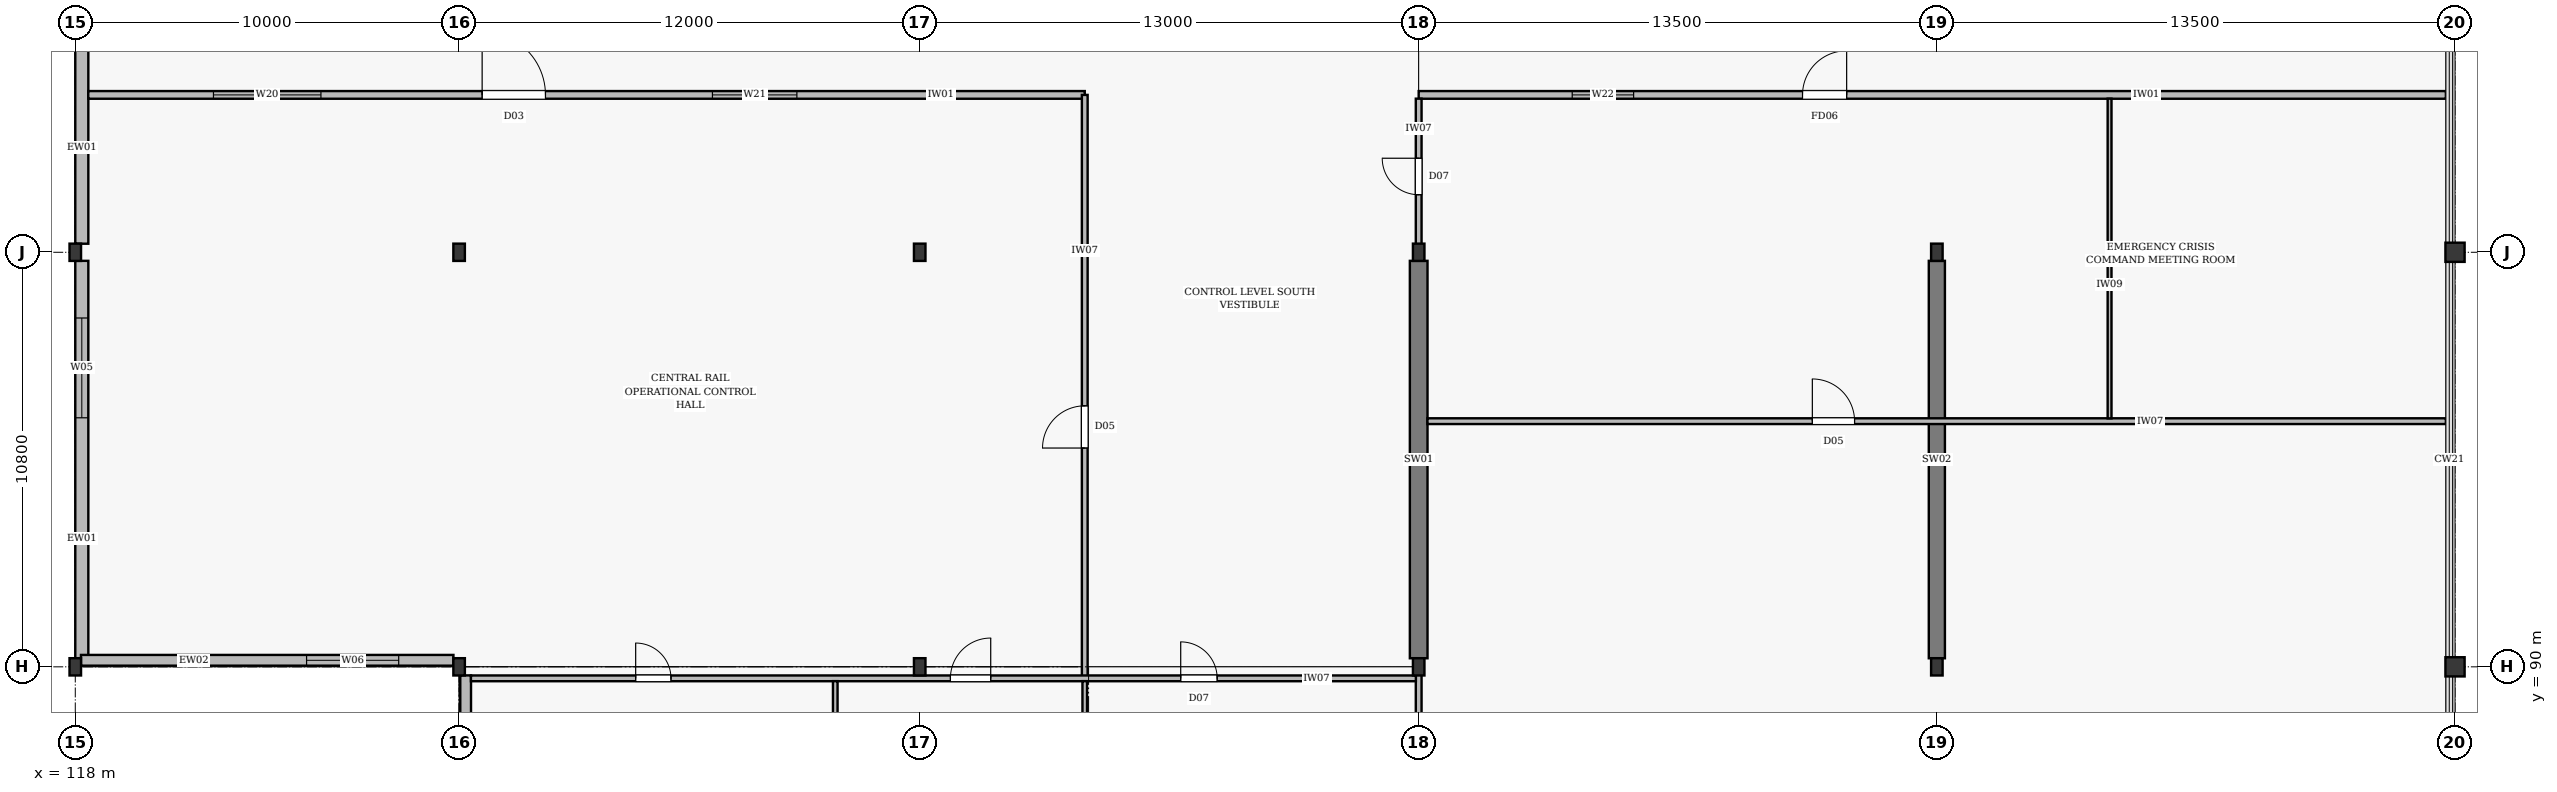
"""IFC4 building model, lengths in metres.
Left out: names, types, materials, properties, quantities, classifications, styles, units other than length and angle.
Written with IfcOpenShell. Run it as: python <this file> out.ifc"""

import sys

from ifc_helpers import new_model, si_unit, direction, frame, frame_2d, origin, origin_2d, place, context, subcontext, project, spatial, rectangle, i_section, extrude, element, fill, save


model = new_model("IFC4")
c1 = context("Model", 3, precision=1e-05, world=origin(), true_north=direction((0.0, 1.0)))
c2 = subcontext(c1, "Body", "Model", "MODEL_VIEW")
j1 = project(units=[si_unit("LENGTHUNIT", "METRE"), si_unit("PLANEANGLEUNIT", "RADIAN")], contexts=[c1])
p1 = place(None, origin())
s1 = spatial("IfcSite", under=j1, at=p1, CompositionType="ELEMENT")
p2 = place(p1, origin())
s2 = spatial("IfcBuilding", under=s1, at=p2, CompositionType="ELEMENT")
p3 = place(p2, frame((0.0, 0.0, 17.4)))
s3 = spatial("IfcBuildingStorey", under=s2, at=p3, CompositionType="ELEMENT", Elevation=17.4)
for number, where, z_axis, x_axis in (
    (1, (118.0, 90.0, 0.0), (0.0, 0.0, 1.0), (1.0, 0.0, 0.0)),
    (2, (118.0, 100.8, 0.0), (0.0, 0.0, 1.0), (1.0, 0.0, 0.0)),
    (3, (128.0, 90.0, 0.0), (0.0, 0.0, 1.0), (1.0, 0.0, 0.0)),
    (4, (128.0, 100.8, 0.0), (0.0, 0.0, 1.0), (1.0, 0.0, 0.0)),
    (5, (140.0, 90.0, 0.0), (0.0, 0.0, 1.0), (1.0, 0.0, 0.0)),
    (6, (140.0, 100.8, 0.0), (0.0, 0.0, 1.0), (1.0, 0.0, 0.0)),
    (7, (153.0, 90.0, 0.0), (0.0, 0.0, 1.0), (1.0, 0.0, 0.0)),
    (8, (153.0, 100.8, 0.0), (0.0, 0.0, 1.0), (1.0, 0.0, 0.0)),
    (9, (166.5, 90.0, 0.0), (0.0, 0.0, 1.0), (1.0, 0.0, 0.0)),
    (10, (166.5, 100.8, 0.0), (0.0, 0.0, 1.0), (1.0, 0.0, 0.0)),
):
    element("IfcColumn", number, at=place(p3, frame(where, z_axis=z_axis, x_axis=x_axis)), inside=s3, PredefinedType="COLUMN", context=c2, shape_type="SweptSolid", body=[
        extrude(i_section(OverallWidth=0.3, OverallDepth=0.45, WebThickness=0.014, FlangeThickness=0.026, at=origin_2d()), origin(), (0.0, 0.0, 1.0), 3.9),
    ])
for number, where, z_axis, x_axis in (
    (11, (180.0, 90.0, 0.0), (0.0, 0.0, 1.0), (1.0, 0.0, 0.0)),
    (12, (180.0, 100.8, 0.0), (0.0, 0.0, 1.0), (1.0, 0.0, 0.0)),
):
    element("IfcColumn", number, at=place(p3, frame(where, z_axis=z_axis, x_axis=x_axis)), inside=s3, PredefinedType="COLUMN", context=c2, shape_type="SweptSolid", body=[
        extrude(rectangle(XDim=0.5, YDim=0.5, at=origin_2d()), origin(), (0.0, 0.0, 1.0), 3.9),
    ])
p4 = place(p3, frame((153.0, 90.223, 0.0), z_axis=(0.0, 0.0, 1.0), x_axis=(0.0, 1.0, 0.0)))
e13 = element("IfcWall", 13, at=p4, inside=s3, PredefinedType="SHEAR", context=c2, shape_type="SweptSolid", body=[
    extrude(rectangle(XDim=10.354, YDim=0.46, at=frame_2d((5.177, 0.0))), origin(), (0.0, 0.0, 1.0), 3.68),
])
p5 = place(p3, frame((166.5, 90.223, 0.0), z_axis=(0.0, 0.0, 1.0), x_axis=(0.0, 1.0, 0.0)))
e14 = element("IfcWall", 14, at=p5, inside=s3, PredefinedType="SHEAR", context=c2, shape_type="SweptSolid", body=[
    extrude(rectangle(XDim=10.354, YDim=0.42, at=frame_2d((5.177, 0.0))), origin(), (0.0, 0.0, 1.0), 3.68),
])
p6 = place(p3, frame((118.17, 90.223, 0.0), z_axis=(0.0, 0.0, 1.0), x_axis=(0.0, 1.0, 0.0)))
e15 = element("IfcWall", 15, at=p6, inside=s3, PredefinedType="STANDARD", context=c2, shape_type="SweptSolid", body=[
    extrude(rectangle(XDim=10.354, YDim=0.34, at=frame_2d((5.177, 0.0))), origin(), (0.0, 0.0, 1.0), 3.25),
])
p7 = place(p6, frame((6.265, 0.0, 0.61)))
e16 = element("IfcOpeningElement", 16, at=p7, cuts=e15, PredefinedType="OPENING", context=c2, shape_type="SweptSolid", body=[
    extrude(rectangle(XDim=2.6, YDim=2.4, at=frame_2d((1.3, 1.2))), frame((0.0, 0.182, 0.0), z_axis=(0.0, -1.0, 0.0), x_axis=(1.0, 0.0, 0.0)), (0.0, 0.0, 1.0), 0.364),
])
p8 = place(p3, frame((118.17, 101.023, 0.0), z_axis=(0.0, 0.0, 1.0), x_axis=(0.0, 1.0, 0.0)))
e17 = element("IfcWall", 17, at=p8, inside=s3, PredefinedType="STANDARD", context=c2, shape_type="SweptSolid", body=[
    extrude(rectangle(XDim=10.354, YDim=0.34, at=frame_2d((5.177, 0.0))), origin(), (0.0, 0.0, 1.0), 3.22),
])
p9 = place(p8, frame((5.015, 0.0, 0.58)))
e18 = element("IfcOpeningElement", 18, at=p9, cuts=e17, PredefinedType="OPENING", context=c2, shape_type="SweptSolid", body=[
    extrude(rectangle(XDim=2.6, YDim=2.4, at=frame_2d((1.3, 1.2))), frame((0.0, 0.182, 0.0), z_axis=(0.0, -1.0, 0.0), x_axis=(1.0, 0.0, 0.0)), (0.0, 0.0, 1.0), 0.364),
])
p10 = place(p3, frame((118.148, 90.17, 0.0), z_axis=(0.0, 0.0, 1.0), x_axis=(1.0, 0.0, 0.0)))
e19 = element("IfcWall", 19, at=p10, inside=s3, PredefinedType="STANDARD", context=c2, shape_type="SweptSolid", body=[
    extrude(rectangle(XDim=9.704, YDim=0.28, at=frame_2d((4.852, 0.0))), origin(), (0.0, 0.0, 1.0), 3.22),
])
p11 = place(p10, frame((5.878, 0.0, 0.58)))
e20 = element("IfcOpeningElement", 20, at=p11, cuts=e19, PredefinedType="OPENING", context=c2, shape_type="SweptSolid", body=[
    extrude(rectangle(XDim=2.4, YDim=2.4, at=frame_2d((1.2, 1.2))), frame((0.0, 0.152, 0.0), z_axis=(0.0, -1.0, 0.0), x_axis=(1.0, 0.0, 0.0)), (0.0, 0.0, 1.0), 0.304),
])
p12 = place(p3, frame((128.17, 79.423, 0.0), z_axis=(0.0, 0.0, 1.0), x_axis=(0.0, 1.0, 0.0)))
e21 = element("IfcWall", 21, at=p12, inside=s3, PredefinedType="STANDARD", context=c2, shape_type="SweptSolid", body=[
    extrude(rectangle(XDim=10.354, YDim=0.28, at=frame_2d((5.177, 0.0))), origin(), (0.0, 0.0, 1.0), 3.22),
])
p13 = place(p12, frame((1.688, 0.0, 0.75)))
e22 = element("IfcOpeningElement", 22, at=p13, cuts=e21, PredefinedType="OPENING", context=c2, shape_type="SweptSolid", body=[
    extrude(rectangle(XDim=2.2, YDim=2.2, at=frame_2d((1.1, 1.1))), frame((0.0, 0.152, 0.0), z_axis=(0.0, -1.0, 0.0), x_axis=(1.0, 0.0, 0.0)), (0.0, 0.0, 1.0), 0.304),
])
p14 = place(p12, frame((6.965, 0.0, 1.05)))
e23 = element("IfcOpeningElement", 23, at=p14, cuts=e21, PredefinedType="OPENING", context=c2, shape_type="SweptSolid", body=[
    extrude(rectangle(XDim=1.2, YDim=0.9, at=frame_2d((0.6, 0.45))), frame((0.0, 0.152, 0.0), z_axis=(0.0, -1.0, 0.0), x_axis=(1.0, 0.0, 0.0)), (0.0, 0.0, 1.0), 0.304),
])
p15 = place(p3, frame((118.338, 104.9, 0.0), z_axis=(0.0, 0.0, 1.0), x_axis=(1.0, 0.0, 0.0)))
e24 = element("IfcWall", 24, at=p15, inside=s3, PredefinedType="PARTITIONING", context=c2, shape_type="SweptSolid", body=[
    extrude(rectangle(XDim=25.962, YDim=0.2, at=frame_2d((12.981, 0.0))), origin(), (0.0, 0.0, 1.0), 3.31),
])
p16 = place(p15, frame((10.262, 0.0, 0.005)))
e25 = element("IfcOpeningElement", 25, at=p16, cuts=e24, PredefinedType="OPENING", context=c2, shape_type="SweptSolid", body=[
    extrude(rectangle(XDim=1.65, YDim=2.2, at=frame_2d((0.825, 1.1))), frame((0.0, 0.112, 0.0), z_axis=(0.0, -1.0, 0.0), x_axis=(1.0, 0.0, 0.0)), (0.0, 0.0, 1.0), 0.224),
])
p17 = place(p15, frame((3.262, 0.0, 1.05)))
e26 = element("IfcOpeningElement", 26, at=p17, cuts=e24, PredefinedType="OPENING", context=c2, shape_type="SweptSolid", body=[
    extrude(rectangle(XDim=2.8, YDim=1.8, at=frame_2d((1.4, 0.9))), frame((0.0, 0.112, 0.0), z_axis=(0.0, -1.0, 0.0), x_axis=(1.0, 0.0, 0.0)), (0.0, 0.0, 1.0), 0.224),
])
p18 = place(p15, frame((16.262, 0.0, 1.05)))
e27 = element("IfcOpeningElement", 27, at=p18, cuts=e24, PredefinedType="OPENING", context=c2, shape_type="SweptSolid", body=[
    extrude(rectangle(XDim=2.2, YDim=1.6, at=frame_2d((1.1, 0.8))), frame((0.0, 0.112, 0.0), z_axis=(0.0, -1.0, 0.0), x_axis=(1.0, 0.0, 0.0)), (0.0, 0.0, 1.0), 0.224),
])
p19 = place(p3, frame((153.0, 104.9, 0.0), z_axis=(0.0, 0.0, 1.0), x_axis=(1.0, 0.0, 0.0)))
e28 = element("IfcWall", 28, at=p19, inside=s3, PredefinedType="PARTITIONING", context=c2, shape_type="SweptSolid", body=[
    extrude(rectangle(XDim=26.762, YDim=0.2, at=frame_2d((13.381, 0.0))), origin(), (0.0, 0.0, 1.0), 3.31),
])
p20 = place(p19, frame((10.0, 0.0, 0.005)))
e29 = element("IfcOpeningElement", 29, at=p20, cuts=e28, PredefinedType="OPENING", context=c2, shape_type="SweptSolid", body=[
    extrude(rectangle(XDim=1.15, YDim=2.15, at=frame_2d((0.575, 1.075))), frame((0.0, 0.112, 0.0), z_axis=(0.0, -1.0, 0.0), x_axis=(1.0, 0.0, 0.0)), (0.0, 0.0, 1.0), 0.224),
])
p21 = place(p19, frame((4.0, 0.0, 1.05)))
e30 = element("IfcOpeningElement", 30, at=p21, cuts=e28, PredefinedType="OPENING", context=c2, shape_type="SweptSolid", body=[
    extrude(rectangle(XDim=1.6, YDim=1.5, at=frame_2d((0.8, 0.75))), frame((0.0, 0.112, 0.0), z_axis=(0.0, -1.0, 0.0), x_axis=(1.0, 0.0, 0.0)), (0.0, 0.0, 1.0), 0.224),
])
p22 = place(p3, frame((144.3, 89.7, 0.0), z_axis=(0.0, 0.0, 1.0), x_axis=(0.0, 1.0, 0.0)))
e31 = element("IfcWall", 31, at=p22, inside=s3, PredefinedType="PARTITIONING", context=c2, shape_type="SweptSolid", body=[
    extrude(rectangle(XDim=15.2, YDim=0.15, at=frame_2d((7.6, 0.0))), origin(), (0.0, 0.0, 1.0), 3.12),
])
p23 = place(p22, frame((6.0, 0.0, 0.005)))
e32 = element("IfcOpeningElement", 32, at=p23, cuts=e31, PredefinedType="OPENING", context=c2, shape_type="SweptSolid", body=[
    extrude(rectangle(XDim=1.1, YDim=2.1, at=frame_2d((0.55, 1.05))), frame((0.0, 0.087, 0.0), z_axis=(0.0, -1.0, 0.0), x_axis=(1.0, 0.0, 0.0)), (0.0, 0.0, 1.0), 0.174),
])
p24 = place(p3, frame((153.0, 79.478, 0.0), z_axis=(0.0, 0.0, 1.0), x_axis=(0.0, 1.0, 0.0)))
e33 = element("IfcWall", 33, at=p24, inside=s3, PredefinedType="PARTITIONING", context=c2, shape_type="SweptSolid", body=[
    extrude(rectangle(XDim=10.522, YDim=0.15, at=frame_2d((5.261, 0.0))), origin(), (0.0, 0.0, 1.0), 3.12),
])
p25 = place(p24, frame((5.322, 0.0, 0.005)))
e34 = element("IfcOpeningElement", 34, at=p25, cuts=e33, PredefinedType="OPENING", context=c2, shape_type="SweptSolid", body=[
    extrude(rectangle(XDim=1.1, YDim=2.1, at=frame_2d((0.55, 1.05))), frame((0.0, 0.087, 0.0), z_axis=(0.0, -1.0, 0.0), x_axis=(1.0, 0.0, 0.0)), (0.0, 0.0, 1.0), 0.174),
])
p26 = place(p3, frame((153.0, 100.8, 0.0), z_axis=(0.0, 0.0, 1.0), x_axis=(0.0, 1.0, 0.0)))
e35 = element("IfcWall", 35, at=p26, inside=s3, PredefinedType="PARTITIONING", context=c2, shape_type="SweptSolid", body=[
    extrude(rectangle(XDim=4.002, YDim=0.15, at=frame_2d((2.001, 0.0))), origin(), (0.0, 0.0, 1.0), 3.12),
])
p27 = place(p26, frame((1.5, 0.0, 0.005)))
e36 = element("IfcOpeningElement", 36, at=p27, cuts=e35, PredefinedType="OPENING", context=c2, shape_type="SweptSolid", body=[
    extrude(rectangle(XDim=0.95, YDim=2.1, at=frame_2d((0.475, 1.05))), frame((0.0, 0.087, 0.0), z_axis=(0.0, -1.0, 0.0), x_axis=(1.0, 0.0, 0.0)), (0.0, 0.0, 1.0), 0.174),
])
p28 = place(p3, frame((153.228, 96.4, 0.0), z_axis=(0.0, 0.0, 1.0), x_axis=(1.0, 0.0, 0.0)))
e37 = element("IfcWall", 37, at=p28, inside=s3, PredefinedType="PARTITIONING", context=c2, shape_type="SweptSolid", body=[
    extrude(rectangle(XDim=26.534, YDim=0.15, at=frame_2d((13.267, 0.0))), origin(), (0.0, 0.0, 1.0), 3.31),
])
p29 = place(p28, frame((10.028, 0.0, 0.005)))
e38 = element("IfcOpeningElement", 38, at=p29, cuts=e37, PredefinedType="OPENING", context=c2, shape_type="SweptSolid", body=[
    extrude(rectangle(XDim=1.1, YDim=2.1, at=frame_2d((0.55, 1.05))), frame((0.0, 0.087, 0.0), z_axis=(0.0, -1.0, 0.0), x_axis=(1.0, 0.0, 0.0)), (0.0, 0.0, 1.0), 0.174),
])
p30 = place(p3, frame((128.308, 89.7, 0.0), z_axis=(0.0, 0.0, 1.0), x_axis=(1.0, 0.0, 0.0)))
e39 = element("IfcWall", 39, at=p30, inside=s3, PredefinedType="PARTITIONING", context=c2, shape_type="SweptSolid", body=[
    extrude(rectangle(XDim=24.619, YDim=0.15, at=frame_2d((12.31, 0.0))), origin(), (0.0, 0.0, 1.0), 3.12),
])
p31 = place(p30, frame((4.292, 0.0, 0.005)))
e40 = element("IfcOpeningElement", 40, at=p31, cuts=e39, PredefinedType="OPENING", context=c2, shape_type="SweptSolid", body=[
    extrude(rectangle(XDim=0.92, YDim=2.12, at=frame_2d((0.46, 1.06))), frame((0.0, 0.087, 0.0), z_axis=(0.0, -1.0, 0.0), x_axis=(1.0, 0.0, 0.0)), (0.0, 0.0, 1.0), 0.174),
])
p32 = place(p30, frame((12.492, 0.0, 0.005)))
e41 = element("IfcOpeningElement", 41, at=p32, cuts=e39, PredefinedType="OPENING", context=c2, shape_type="SweptSolid", body=[
    extrude(rectangle(XDim=1.05, YDim=2.15, at=frame_2d((0.525, 1.075))), frame((0.0, 0.087, 0.0), z_axis=(0.0, -1.0, 0.0), x_axis=(1.0, 0.0, 0.0)), (0.0, 0.0, 1.0), 0.174),
])
p33 = place(p30, frame((18.492, 0.0, 0.005)))
e42 = element("IfcOpeningElement", 42, at=p33, cuts=e39, PredefinedType="OPENING", context=c2, shape_type="SweptSolid", body=[
    extrude(rectangle(XDim=0.95, YDim=2.1, at=frame_2d((0.475, 1.05))), frame((0.0, 0.087, 0.0), z_axis=(0.0, -1.0, 0.0), x_axis=(1.0, 0.0, 0.0)), (0.0, 0.0, 1.0), 0.174),
])
p34 = place(p3, frame((137.8, 79.478, 0.0), z_axis=(0.0, 0.0, 1.0), x_axis=(0.0, 1.0, 0.0)))
e43 = element("IfcWall", 43, at=p34, inside=s3, PredefinedType="PARTITIONING", context=c2, shape_type="SweptSolid", body=[
    extrude(rectangle(XDim=10.149, YDim=0.12, at=frame_2d((5.074, 0.0))), origin(), (0.0, 0.0, 1.0), 3.22),
])
p35 = place(p3, frame((144.3, 79.478, 0.0), z_axis=(0.0, 0.0, 1.0), x_axis=(0.0, 1.0, 0.0)))
e44 = element("IfcWall", 44, at=p35, inside=s3, PredefinedType="PARTITIONING", context=c2, shape_type="SweptSolid", body=[
    extrude(rectangle(XDim=10.149, YDim=0.12, at=frame_2d((5.074, 0.0))), origin(), (0.0, 0.0, 1.0), 3.12),
])
p36 = place(p3, frame((171.0, 96.473, 0.0), z_axis=(0.0, 0.0, 1.0), x_axis=(0.0, 1.0, 0.0)))
e45 = element("IfcWall", 45, at=p36, inside=s3, PredefinedType="MOVABLE", context=c2, shape_type="SweptSolid", body=[
    extrude(rectangle(XDim=8.329, YDim=0.1, at=frame_2d((4.165, 0.0))), origin(), (0.0, 0.0, 1.0), 3.12),
])
p37 = place(p7, origin())
e46 = element("IfcWindow", 46, at=p37, inside=s3, PartitioningType="DOUBLE_PANEL_VERTICAL", PredefinedType="WINDOW", context=c2, shape_type="SweptSolid", body=[
    extrude(rectangle(XDim=2.6, YDim=2.4, at=frame_2d((1.3, 1.2))), frame((0.0, 0.03, 0.0), z_axis=(0.0, -1.0, 0.0), x_axis=(1.0, 0.0, 0.0)), (0.0, 0.0, 1.0), 0.06),
])
fill(e16, e46)
p38 = place(p11, origin())
e47 = element("IfcWindow", 47, at=p38, inside=s3, PartitioningType="DOUBLE_PANEL_VERTICAL", PredefinedType="WINDOW", context=c2, shape_type="SweptSolid", body=[
    extrude(rectangle(XDim=2.4, YDim=2.4, at=frame_2d((1.2, 1.2))), frame((0.0, 0.03, 0.0), z_axis=(0.0, -1.0, 0.0), x_axis=(1.0, 0.0, 0.0)), (0.0, 0.0, 1.0), 0.06),
])
fill(e20, e47)
p39 = place(p16, origin())
e48 = element("IfcDoor", 48, at=p39, inside=s3, OperationType="DOUBLE_DOOR_SINGLE_SWING", PredefinedType="DOOR", context=c2, shape_type="SweptSolid", body=[
    extrude(rectangle(XDim=1.65, YDim=2.2, at=frame_2d((0.825, 1.1))), frame((0.0, 0.025, 0.0), z_axis=(0.0, -1.0, 0.0), x_axis=(1.0, 0.0, 0.0)), (0.0, 0.0, 1.0), 0.05),
])
fill(e25, e48)
p40 = place(p17, origin())
e49 = element("IfcWindow", 49, at=p40, inside=s3, PartitioningType="DOUBLE_PANEL_VERTICAL", PredefinedType="WINDOW", context=c2, shape_type="SweptSolid", body=[
    extrude(rectangle(XDim=2.8, YDim=1.8, at=frame_2d((1.4, 0.9))), frame((0.0, 0.03, 0.0), z_axis=(0.0, -1.0, 0.0), x_axis=(1.0, 0.0, 0.0)), (0.0, 0.0, 1.0), 0.06),
])
fill(e26, e49)
p41 = place(p18, origin())
e50 = element("IfcWindow", 50, at=p41, inside=s3, PartitioningType="DOUBLE_PANEL_VERTICAL", PredefinedType="WINDOW", context=c2, shape_type="SweptSolid", body=[
    extrude(rectangle(XDim=2.2, YDim=1.6, at=frame_2d((1.1, 0.8))), frame((0.0, 0.03, 0.0), z_axis=(0.0, -1.0, 0.0), x_axis=(1.0, 0.0, 0.0)), (0.0, 0.0, 1.0), 0.06),
])
fill(e27, e50)
p42 = place(p20, origin())
e51 = element("IfcDoor", 51, at=p42, inside=s3, OperationType="SINGLE_SWING_RIGHT", PredefinedType="DOOR", context=c2, shape_type="SweptSolid", body=[
    extrude(rectangle(XDim=1.15, YDim=2.15, at=frame_2d((0.575, 1.075))), frame((0.0, 0.025, 0.0), z_axis=(0.0, -1.0, 0.0), x_axis=(1.0, 0.0, 0.0)), (0.0, 0.0, 1.0), 0.05),
])
fill(e29, e51)
p43 = place(p21, origin())
e52 = element("IfcWindow", 52, at=p43, inside=s3, PartitioningType="DOUBLE_PANEL_VERTICAL", PredefinedType="WINDOW", context=c2, shape_type="SweptSolid", body=[
    extrude(rectangle(XDim=1.6, YDim=1.5, at=frame_2d((0.8, 0.75))), frame((0.0, 0.03, 0.0), z_axis=(0.0, -1.0, 0.0), x_axis=(1.0, 0.0, 0.0)), (0.0, 0.0, 1.0), 0.06),
])
fill(e30, e52)
p44 = place(p23, origin())
e53 = element("IfcDoor", 53, at=p44, inside=s3, OperationType="SINGLE_SWING_LEFT", PredefinedType="DOOR", context=c2, shape_type="SweptSolid", body=[
    extrude(rectangle(XDim=1.1, YDim=2.1, at=frame_2d((0.55, 1.05))), frame((0.0, 0.025, 0.0), z_axis=(0.0, -1.0, 0.0), x_axis=(1.0, 0.0, 0.0)), (0.0, 0.0, 1.0), 0.05),
])
fill(e32, e53)
p45 = place(p27, origin())
e54 = element("IfcDoor", 54, at=p45, inside=s3, OperationType="SINGLE_SWING_RIGHT", PredefinedType="DOOR", context=c2, shape_type="SweptSolid", body=[
    extrude(rectangle(XDim=0.95, YDim=2.1, at=frame_2d((0.475, 1.05))), frame((0.0, 0.025, 0.0), z_axis=(0.0, -1.0, 0.0), x_axis=(1.0, 0.0, 0.0)), (0.0, 0.0, 1.0), 0.05),
])
fill(e36, e54)
p46 = place(p29, origin())
e55 = element("IfcDoor", 55, at=p46, inside=s3, OperationType="SINGLE_SWING_LEFT", PredefinedType="DOOR", context=c2, shape_type="SweptSolid", body=[
    extrude(rectangle(XDim=1.1, YDim=2.1, at=frame_2d((0.55, 1.05))), frame((0.0, 0.025, 0.0), z_axis=(0.0, -1.0, 0.0), x_axis=(1.0, 0.0, 0.0)), (0.0, 0.0, 1.0), 0.05),
])
fill(e38, e55)
p47 = place(p31, origin())
e56 = element("IfcDoor", 56, at=p47, inside=s3, OperationType="SINGLE_SWING_LEFT", PredefinedType="DOOR", context=c2, shape_type="SweptSolid", body=[
    extrude(rectangle(XDim=0.92, YDim=2.12, at=frame_2d((0.46, 1.06))), frame((0.0, 0.025, 0.0), z_axis=(0.0, -1.0, 0.0), x_axis=(1.0, 0.0, 0.0)), (0.0, 0.0, 1.0), 0.05),
])
fill(e40, e56)
p48 = place(p32, origin())
e57 = element("IfcDoor", 57, at=p48, inside=s3, OperationType="SINGLE_SWING_RIGHT", PredefinedType="DOOR", context=c2, shape_type="SweptSolid", body=[
    extrude(rectangle(XDim=1.05, YDim=2.15, at=frame_2d((0.525, 1.075))), frame((0.0, 0.025, 0.0), z_axis=(0.0, -1.0, 0.0), x_axis=(1.0, 0.0, 0.0)), (0.0, 0.0, 1.0), 0.05),
])
fill(e41, e57)
p49 = place(p33, origin())
e58 = element("IfcDoor", 58, at=p49, inside=s3, OperationType="SINGLE_SWING_LEFT", PredefinedType="DOOR", context=c2, shape_type="SweptSolid", body=[
    extrude(rectangle(XDim=0.95, YDim=2.1, at=frame_2d((0.475, 1.05))), frame((0.0, 0.025, 0.0), z_axis=(0.0, -1.0, 0.0), x_axis=(1.0, 0.0, 0.0)), (0.0, 0.0, 1.0), 0.05),
])
fill(e42, e58)
save(model, sys.argv[1])
